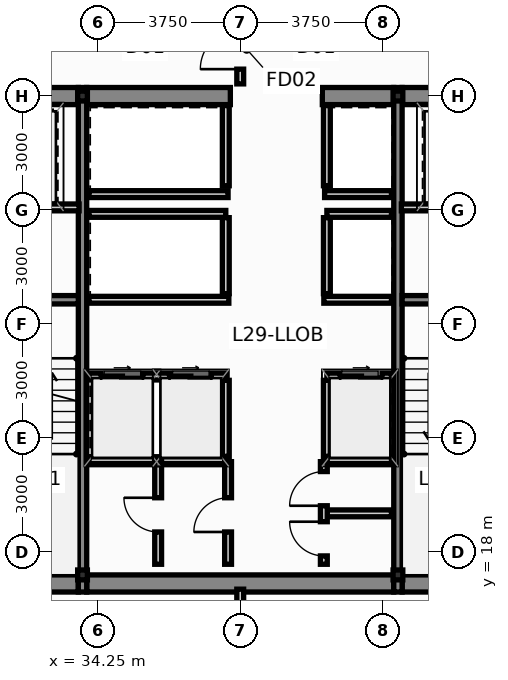
"""IFC4 building model, lengths in metres.
Left out: names, types, materials, properties, quantities, classifications, styles, units other than length and angle.
Written with IfcOpenShell. Run it as: python <this file> out.ifc"""

import sys

from ifc_helpers import new_model, si_unit, direction, frame, frame_2d, origin, origin_2d, place, context, subcontext, project, spatial, rectangle, i_section, extrude, source, transform, mapped, element, fill, save


model = new_model("IFC4")
c1 = context("Model", 3, precision=1e-05, world=origin(), true_north=direction((0.0, 1.0)))
c2 = subcontext(c1, "Body", "Model", "MODEL_VIEW")
j1 = project(units=[si_unit("LENGTHUNIT", "METRE"), si_unit("PLANEANGLEUNIT", "RADIAN")], contexts=[c1])
p1 = place(None, origin())
s1 = spatial("IfcSite", under=j1, at=p1, CompositionType="ELEMENT")
p2 = place(p1, origin())
s2 = spatial("IfcBuilding", under=s1, at=p2, CompositionType="ELEMENT")
p3 = place(p2, frame((0.0, 0.0, 112.7)))
s3 = spatial("IfcBuildingStorey", under=s2, at=p3, CompositionType="ELEMENT", Elevation=112.7)
m1 = source(origin(), c2, "Body", "SweptSolid", [
    extrude(i_section(OverallWidth=0.256, OverallDepth=0.26, WebThickness=0.01, FlangeThickness=0.017, at=origin_2d()), origin(), (0.0, 0.0, 1.0), 3.65),
])
for number, where, z_axis, x_axis in (
    (1, (33.85, 17.4, 0.0), (0.0, 0.0, 1.0), (1.0, 0.0, 0.0)),
    (2, (42.15, 17.4, 0.0), (0.0, 0.0, 1.0), (1.0, 0.0, 0.0)),
    (3, (33.85, 30.0, 0.0), (0.0, 0.0, 1.0), (1.0, 0.0, 0.0)),
    (4, (42.15, 30.0, 0.0), (0.0, 0.0, 1.0), (1.0, 0.0, 0.0)),
):
    element("IfcColumn", number, at=place(p3, frame(where, z_axis=z_axis, x_axis=x_axis)), inside=s3, PredefinedType="COLUMN", context=c2, shape_type="MappedRepresentation", body=[
        mapped(m1, transform((0.0, 0.0, 0.0), scale=1.0)),
    ])
p4 = place(p3, frame((30.84, 17.175, 0.0), z_axis=(0.0, 0.0, 1.0), x_axis=(1.0, 0.0, 0.0)))
e5 = element("IfcWall", 5, at=p4, inside=s3, PredefinedType="SHEAR", context=c2, shape_type="SweptSolid", body=[
    extrude(rectangle(XDim=2.9, YDim=0.45, at=frame_2d((1.45, 0.0))), origin(), (0.0, 0.0, 1.0), 3.65),
])
p5 = place(p3, frame((33.96, 17.175, 0.0), z_axis=(0.0, 0.0, 1.0), x_axis=(1.0, 0.0, 0.0)))
e6 = element("IfcWall", 6, at=p5, inside=s3, PredefinedType="SHEAR", context=c2, shape_type="SweptSolid", body=[
    extrude(rectangle(XDim=8.08, YDim=0.45, at=frame_2d((4.04, 0.0))), origin(), (0.0, 0.0, 1.0), 3.65),
])
for number, where, z_axis, x_axis in (
    (7, (42.26, 17.175, 0.0), (0.0, 0.0, 1.0), (1.0, 0.0, 0.0)),
    (8, (30.84, 30.0, 0.0), (0.0, 0.0, 1.0), (1.0, 0.0, 0.0)),
):
    element("IfcWall", number, at=place(p3, frame(where, z_axis=z_axis, x_axis=x_axis)), inside=s3, PredefinedType="SHEAR", context=c2, shape_type="SweptSolid", body=[
        extrude(rectangle(XDim=2.9, YDim=0.45, at=frame_2d((1.45, 0.0))), origin(), (0.0, 0.0, 1.0), 3.65),
    ])
p6 = place(p3, frame((33.96, 30.0, 0.0), z_axis=(0.0, 0.0, 1.0), x_axis=(1.0, 0.0, 0.0)))
e9 = element("IfcWall", 9, at=p6, inside=s3, PredefinedType="SHEAR", context=c2, shape_type="SweptSolid", body=[
    extrude(rectangle(XDim=3.78, YDim=0.45, at=frame_2d((1.89, 0.0))), origin(), (0.0, 0.0, 1.0), 3.65),
])
p7 = place(p3, frame((40.16, 30.0, 0.0), z_axis=(0.0, 0.0, 1.0), x_axis=(1.0, 0.0, 0.0)))
e10 = element("IfcWall", 10, at=p7, inside=s3, PredefinedType="SHEAR", context=c2, shape_type="SweptSolid", body=[
    extrude(rectangle(XDim=1.88, YDim=0.45, at=frame_2d((0.94, 0.0))), origin(), (0.0, 0.0, 1.0), 3.65),
])
p8 = place(p3, frame((42.26, 30.0, 0.0), z_axis=(0.0, 0.0, 1.0), x_axis=(1.0, 0.0, 0.0)))
e11 = element("IfcWall", 11, at=p8, inside=s3, PredefinedType="SHEAR", context=c2, shape_type="SweptSolid", body=[
    extrude(rectangle(XDim=2.9, YDim=0.45, at=frame_2d((1.45, 0.0))), origin(), (0.0, 0.0, 1.0), 3.65),
])
for number, where, z_axis, x_axis in (
    (12, (33.85, 16.95, 0.0), (0.0, 0.0, 1.0), (0.0, 1.0, 0.0)),
    (13, (42.15, 16.95, 0.0), (0.0, 0.0, 1.0), (0.0, 1.0, 0.0)),
):
    element("IfcWall", number, at=place(p3, frame(where, z_axis=z_axis, x_axis=x_axis)), inside=s3, PredefinedType="SHEAR", context=c2, shape_type="SweptSolid", body=[
        extrude(rectangle(XDim=13.275, YDim=0.22, at=frame_2d((6.638, 0.0))), origin(), (0.0, 0.0, 1.0), 3.65),
    ])
for number, where, z_axis, x_axis in (
    (14, (30.84, 24.64, 0.0), (0.0, 0.0, 1.0), (1.0, 0.0, 0.0)),
    (15, (42.26, 24.64, 0.0), (0.0, 0.0, 1.0), (1.0, 0.0, 0.0)),
):
    element("IfcWall", number, at=place(p3, frame(where, z_axis=z_axis, x_axis=x_axis)), inside=s3, PredefinedType="SHEAR", context=c2, shape_type="SweptSolid", body=[
        extrude(rectangle(XDim=2.9, YDim=0.22, at=frame_2d((1.45, 0.0))), origin(), (0.0, 0.0, 1.0), 3.65),
    ])
p9 = place(p3, frame((34.02, 22.62, 0.0), z_axis=(0.0, 0.0, 1.0), x_axis=(1.0, 0.0, 0.0)))
e16 = element("IfcWall", 16, at=p9, inside=s3, PredefinedType="PARTITIONING", context=c2, shape_type="SweptSolid", body=[
    extrude(rectangle(XDim=3.6, YDim=0.18, at=frame_2d((1.8, 0.0))), origin(), (0.0, 0.0, 1.0), 3.4),
])
p10 = place(p9, frame((0.32, 0.0, 0.0)))
e17 = element("IfcOpeningElement", 17, at=p10, cuts=e16, PredefinedType="OPENING", context=c2, shape_type="SweptSolid", body=[
    extrude(rectangle(XDim=1.1, YDim=2.2, at=frame_2d((0.55, 1.1))), frame((0.0, 0.102, 0.0), z_axis=(0.0, -1.0, 0.0), x_axis=(1.0, 0.0, 0.0)), (0.0, 0.0, 1.0), 0.204),
])
p11 = place(p9, frame((2.12, 0.0, 0.0)))
e18 = element("IfcOpeningElement", 18, at=p11, cuts=e16, PredefinedType="OPENING", context=c2, shape_type="SweptSolid", body=[
    extrude(rectangle(XDim=1.1, YDim=2.2, at=frame_2d((0.55, 1.1))), frame((0.0, 0.102, 0.0), z_axis=(0.0, -1.0, 0.0), x_axis=(1.0, 0.0, 0.0)), (0.0, 0.0, 1.0), 0.204),
])
p12 = place(p3, frame((40.28, 22.62, 0.0), z_axis=(0.0, 0.0, 1.0), x_axis=(1.0, 0.0, 0.0)))
e19 = element("IfcWall", 19, at=p12, inside=s3, PredefinedType="PARTITIONING", context=c2, shape_type="SweptSolid", body=[
    extrude(rectangle(XDim=1.7, YDim=0.18, at=frame_2d((0.85, 0.0))), origin(), (0.0, 0.0, 1.0), 3.4),
])
p13 = place(p12, frame((0.35, 0.0, 0.0)))
e20 = element("IfcOpeningElement", 20, at=p13, cuts=e19, PredefinedType="OPENING", context=c2, shape_type="SweptSolid", body=[
    extrude(rectangle(XDim=1.1, YDim=2.2, at=frame_2d((0.55, 1.1))), frame((0.0, 0.102, 0.0), z_axis=(0.0, -1.0, 0.0), x_axis=(1.0, 0.0, 0.0)), (0.0, 0.0, 1.0), 0.204),
])
for number, where, z_axis, x_axis in (
    (21, (37.62, 20.52, 0.0), (0.0, 0.0, 1.0), (0.0, 1.0, 0.0)),
    (22, (40.28, 20.52, 0.0), (0.0, 0.0, 1.0), (0.0, 1.0, 0.0)),
):
    element("IfcWall", number, at=place(p3, frame(where, z_axis=z_axis, x_axis=x_axis)), inside=s3, PredefinedType="PARTITIONING", context=c2, shape_type="SweptSolid", body=[
        extrude(rectangle(XDim=2.0, YDim=0.18, at=frame_2d((1.0, 0.0))), origin(), (0.0, 0.0, 1.0), 3.4),
    ])
p14 = place(p3, frame((34.02, 26.9, 0.0), z_axis=(0.0, 0.0, 1.0), x_axis=(1.0, 0.0, 0.0)))
e23 = element("IfcWall", 23, at=p14, inside=s3, PredefinedType="PARTITIONING", context=c2, shape_type="SweptSolid", body=[
    extrude(rectangle(XDim=3.6, YDim=0.18, at=frame_2d((1.8, 0.0))), origin(), (0.0, 0.0, 1.0), 3.4),
])
p15 = place(p3, frame((40.28, 26.9, 0.0), z_axis=(0.0, 0.0, 1.0), x_axis=(1.0, 0.0, 0.0)))
e24 = element("IfcWall", 24, at=p15, inside=s3, PredefinedType="PARTITIONING", context=c2, shape_type="SweptSolid", body=[
    extrude(rectangle(XDim=1.7, YDim=0.18, at=frame_2d((0.85, 0.0))), origin(), (0.0, 0.0, 1.0), 3.4),
])
for number, where, z_axis, x_axis in (
    (25, (37.62, 24.8, 0.0), (0.0, 0.0, 1.0), (0.0, 1.0, 0.0)),
    (26, (40.28, 24.8, 0.0), (0.0, 0.0, 1.0), (0.0, 1.0, 0.0)),
):
    element("IfcWall", number, at=place(p3, frame(where, z_axis=z_axis, x_axis=x_axis)), inside=s3, PredefinedType="PARTITIONING", context=c2, shape_type="SweptSolid", body=[
        extrude(rectangle(XDim=2.0, YDim=0.18, at=frame_2d((1.0, 0.0))), origin(), (0.0, 0.0, 1.0), 3.4),
    ])
p16 = place(p3, frame((34.02, 24.64, 0.0), z_axis=(0.0, 0.0, 1.0), x_axis=(1.0, 0.0, 0.0)))
e27 = element("IfcWall", 27, at=p16, inside=s3, PredefinedType="PARTITIONING", context=c2, shape_type="SweptSolid", body=[
    extrude(rectangle(XDim=3.68, YDim=0.18, at=frame_2d((1.84, 0.0))), origin(), (0.0, 0.0, 1.0), 3.4),
])
p17 = place(p3, frame((40.2, 24.64, 0.0), z_axis=(0.0, 0.0, 1.0), x_axis=(1.0, 0.0, 0.0)))
e28 = element("IfcWall", 28, at=p17, inside=s3, PredefinedType="PARTITIONING", context=c2, shape_type="SweptSolid", body=[
    extrude(rectangle(XDim=1.78, YDim=0.18, at=frame_2d((0.89, 0.0))), origin(), (0.0, 0.0, 1.0), 3.4),
])
p18 = place(p3, frame((34.02, 27.42, 0.0), z_axis=(0.0, 0.0, 1.0), x_axis=(1.0, 0.0, 0.0)))
e29 = element("IfcWall", 29, at=p18, inside=s3, PredefinedType="PARTITIONING", context=c2, shape_type="SweptSolid", body=[
    extrude(rectangle(XDim=3.66, YDim=0.18, at=frame_2d((1.83, 0.0))), origin(), (0.0, 0.0, 1.0), 3.4),
])
p19 = place(p3, frame((40.22, 27.42, 0.0), z_axis=(0.0, 0.0, 1.0), x_axis=(1.0, 0.0, 0.0)))
e30 = element("IfcWall", 30, at=p19, inside=s3, PredefinedType="PARTITIONING", context=c2, shape_type="SweptSolid", body=[
    extrude(rectangle(XDim=1.76, YDim=0.18, at=frame_2d((0.88, 0.0))), origin(), (0.0, 0.0, 1.0), 3.4),
])
for number, where, z_axis, x_axis in (
    (31, (37.62, 27.64, 0.0), (0.0, 0.0, 1.0), (0.0, 1.0, 0.0)),
    (32, (40.28, 27.64, 0.0), (0.0, 0.0, 1.0), (0.0, 1.0, 0.0)),
):
    element("IfcWall", number, at=place(p3, frame(where, z_axis=z_axis, x_axis=x_axis)), inside=s3, PredefinedType="PARTITIONING", context=c2, shape_type="SweptSolid", body=[
        extrude(rectangle(XDim=2.11, YDim=0.18, at=frame_2d((1.055, 0.0))), origin(), (0.0, 0.0, 1.0), 3.4),
    ])
for number, where, z_axis, x_axis in (
    (33, (30.86, 27.07, 0.0), (0.0, 0.0, 1.0), (1.0, 0.0, 0.0)),
    (34, (42.24, 27.07, 0.0), (0.0, 0.0, 1.0), (1.0, 0.0, 0.0)),
):
    element("IfcWall", number, at=place(p3, frame(where, z_axis=z_axis, x_axis=x_axis)), inside=s3, PredefinedType="PARTITIONING", context=c2, shape_type="SweptSolid", body=[
        extrude(rectangle(XDim=2.9, YDim=0.18, at=frame_2d((1.45, 0.0))), origin(), (0.0, 0.0, 1.0), 3.4),
    ])
p20 = place(p3, frame((34.02, 20.42, 0.0), z_axis=(0.0, 0.0, 1.0), x_axis=(1.0, 0.0, 0.0)))
e35 = element("IfcWall", 35, at=p20, inside=s3, PredefinedType="PARTITIONING", context=c2, shape_type="SweptSolid", body=[
    extrude(rectangle(XDim=3.64, YDim=0.18, at=frame_2d((1.82, 0.0))), origin(), (0.0, 0.0, 1.0), 3.4),
])
p21 = place(p3, frame((40.22, 20.42, 0.0), z_axis=(0.0, 0.0, 1.0), x_axis=(1.0, 0.0, 0.0)))
e36 = element("IfcWall", 36, at=p21, inside=s3, PredefinedType="PARTITIONING", context=c2, shape_type="SweptSolid", body=[
    extrude(rectangle(XDim=1.76, YDim=0.18, at=frame_2d((0.88, 0.0))), origin(), (0.0, 0.0, 1.0), 3.4),
])
p22 = place(p3, frame((35.84, 17.68, 0.0), z_axis=(0.0, 0.0, 1.0), x_axis=(0.0, 1.0, 0.0)))
e37 = element("IfcWall", 37, at=p22, inside=s3, PredefinedType="PARTITIONING", context=c2, shape_type="SweptSolid", body=[
    extrude(rectangle(XDim=2.7, YDim=0.18, at=frame_2d((1.35, 0.0))), origin(), (0.0, 0.0, 1.0), 3.4),
])
p23 = place(p22, frame((0.85, 0.0, 0.0)))
e38 = element("IfcOpeningElement", 38, at=p23, cuts=e37, PredefinedType="OPENING", context=c2, shape_type="SweptSolid", body=[
    extrude(rectangle(XDim=0.9, YDim=2.1, at=frame_2d((0.45, 1.05))), frame((0.0, 0.102, 0.0), z_axis=(0.0, -1.0, 0.0), x_axis=(1.0, 0.0, 0.0)), (0.0, 0.0, 1.0), 0.204),
])
p24 = place(p3, frame((37.68, 17.68, 0.0), z_axis=(0.0, 0.0, 1.0), x_axis=(0.0, 1.0, 0.0)))
e39 = element("IfcWall", 39, at=p24, inside=s3, PredefinedType="PARTITIONING", context=c2, shape_type="SweptSolid", body=[
    extrude(rectangle(XDim=2.7, YDim=0.18, at=frame_2d((1.35, 0.0))), origin(), (0.0, 0.0, 1.0), 3.4),
])
p25 = place(p24, frame((0.85, 0.0, 0.0)))
e40 = element("IfcOpeningElement", 40, at=p25, cuts=e39, PredefinedType="OPENING", context=c2, shape_type="SweptSolid", body=[
    extrude(rectangle(XDim=0.9, YDim=2.1, at=frame_2d((0.45, 1.05))), frame((0.0, 0.102, 0.0), z_axis=(0.0, -1.0, 0.0), x_axis=(1.0, 0.0, 0.0)), (0.0, 0.0, 1.0), 0.204),
])
p26 = place(p3, frame((40.28, 19.02, 0.0), z_axis=(0.0, 0.0, 1.0), x_axis=(1.0, 0.0, 0.0)))
e41 = element("IfcWall", 41, at=p26, inside=s3, PredefinedType="PARTITIONING", context=c2, shape_type="SweptSolid", body=[
    extrude(rectangle(XDim=1.7, YDim=0.18, at=frame_2d((0.85, 0.0))), origin(), (0.0, 0.0, 1.0), 3.4),
])
p27 = place(p3, frame((40.2, 17.68, 0.0), z_axis=(0.0, 0.0, 1.0), x_axis=(0.0, 1.0, 0.0)))
e42 = element("IfcWall", 42, at=p27, inside=s3, PredefinedType="PARTITIONING", context=c2, shape_type="SweptSolid", body=[
    extrude(rectangle(XDim=2.7, YDim=0.18, at=frame_2d((1.35, 0.0))), origin(), (0.0, 0.0, 1.0), 3.4),
])
p28 = place(p27, frame((0.22, 0.0, 0.0)))
e43 = element("IfcOpeningElement", 43, at=p28, cuts=e42, PredefinedType="OPENING", context=c2, shape_type="SweptSolid", body=[
    extrude(rectangle(XDim=0.9, YDim=2.1, at=frame_2d((0.45, 1.05))), frame((0.0, 0.102, 0.0), z_axis=(0.0, -1.0, 0.0), x_axis=(1.0, 0.0, 0.0)), (0.0, 0.0, 1.0), 0.204),
])
p29 = place(p27, frame((1.54, 0.0, 0.0)))
e44 = element("IfcOpeningElement", 44, at=p29, cuts=e42, PredefinedType="OPENING", context=c2, shape_type="SweptSolid", body=[
    extrude(rectangle(XDim=0.9, YDim=2.1, at=frame_2d((0.45, 1.05))), frame((0.0, 0.102, 0.0), z_axis=(0.0, -1.0, 0.0), x_axis=(1.0, 0.0, 0.0)), (0.0, 0.0, 1.0), 0.204),
])
p30 = place(p3, frame((38.0, 15.205, 0.0), z_axis=(0.0, 0.0, 1.0), x_axis=(0.0, 1.0, 0.0)))
e45 = element("IfcWall", 45, at=p30, inside=s3, PredefinedType="PARTITIONING", context=c2, shape_type="SweptSolid", body=[
    extrude(rectangle(XDim=1.82, YDim=0.18, at=frame_2d((0.91, 0.0))), origin(), (0.0, 0.0, 1.0), 3.4),
])
p31 = place(p30, frame((0.385, 0.0, 0.0)))
e46 = element("IfcOpeningElement", 46, at=p31, cuts=e45, PredefinedType="OPENING", context=c2, shape_type="SweptSolid", body=[
    extrude(rectangle(XDim=1.05, YDim=2.15, at=frame_2d((0.525, 1.075))), frame((0.0, 0.102, 0.0), z_axis=(0.0, -1.0, 0.0), x_axis=(1.0, 0.0, 0.0)), (0.0, 0.0, 1.0), 0.204),
])
p32 = place(p3, frame((38.0, 30.32, 0.0), z_axis=(0.0, 0.0, 1.0), x_axis=(0.0, 1.0, 0.0)))
e47 = element("IfcWall", 47, at=p32, inside=s3, PredefinedType="PARTITIONING", context=c2, shape_type="SweptSolid", body=[
    extrude(rectangle(XDim=1.825, YDim=0.18, at=frame_2d((0.913, 0.0))), origin(), (0.0, 0.0, 1.0), 3.4),
])
p33 = place(p32, frame((0.388, 0.0, 0.0)))
e48 = element("IfcOpeningElement", 48, at=p33, cuts=e47, PredefinedType="OPENING", context=c2, shape_type="SweptSolid", body=[
    extrude(rectangle(XDim=1.05, YDim=2.15, at=frame_2d((0.525, 1.075))), frame((0.0, 0.102, 0.0), z_axis=(0.0, -1.0, 0.0), x_axis=(1.0, 0.0, 0.0)), (0.0, 0.0, 1.0), 0.204),
])
p34 = place(p10, origin())
e49 = element("IfcDoor", 49, at=p34, inside=s3, OperationType="SLIDING_TO_LEFT", PredefinedType="DOOR", context=c2, shape_type="SweptSolid", body=[
    extrude(rectangle(XDim=1.1, YDim=2.2, at=frame_2d((0.55, 1.1))), frame((0.0, 0.025, 0.0), z_axis=(0.0, -1.0, 0.0), x_axis=(1.0, 0.0, 0.0)), (0.0, 0.0, 1.0), 0.05),
])
fill(e17, e49)
p35 = place(p11, origin())
e50 = element("IfcDoor", 50, at=p35, inside=s3, OperationType="SLIDING_TO_RIGHT", PredefinedType="DOOR", context=c2, shape_type="SweptSolid", body=[
    extrude(rectangle(XDim=1.1, YDim=2.2, at=frame_2d((0.55, 1.1))), frame((0.0, 0.025, 0.0), z_axis=(0.0, -1.0, 0.0), x_axis=(1.0, 0.0, 0.0)), (0.0, 0.0, 1.0), 0.05),
])
fill(e18, e50)
p36 = place(p13, origin())
e51 = element("IfcDoor", 51, at=p36, inside=s3, OperationType="SLIDING_TO_LEFT", PredefinedType="DOOR", context=c2, shape_type="SweptSolid", body=[
    extrude(rectangle(XDim=1.1, YDim=2.2, at=frame_2d((0.55, 1.1))), frame((0.0, 0.025, 0.0), z_axis=(0.0, -1.0, 0.0), x_axis=(1.0, 0.0, 0.0)), (0.0, 0.0, 1.0), 0.05),
])
fill(e20, e51)
p37 = place(p23, origin())
e52 = element("IfcDoor", 52, at=p37, inside=s3, OperationType="SINGLE_SWING_RIGHT", PredefinedType="DOOR", context=c2, shape_type="SweptSolid", body=[
    extrude(rectangle(XDim=0.9, YDim=2.1, at=frame_2d((0.45, 1.05))), frame((0.0, 0.025, 0.0), z_axis=(0.0, -1.0, 0.0), x_axis=(1.0, 0.0, 0.0)), (0.0, 0.0, 1.0), 0.05),
])
fill(e38, e52)
p38 = place(p25, origin())
e53 = element("IfcDoor", 53, at=p38, inside=s3, OperationType="SINGLE_SWING_LEFT", PredefinedType="DOOR", context=c2, shape_type="SweptSolid", body=[
    extrude(rectangle(XDim=0.9, YDim=2.1, at=frame_2d((0.45, 1.05))), frame((0.0, 0.025, 0.0), z_axis=(0.0, -1.0, 0.0), x_axis=(1.0, 0.0, 0.0)), (0.0, 0.0, 1.0), 0.05),
])
fill(e40, e53)
p39 = place(p28, origin())
e54 = element("IfcDoor", 54, at=p39, inside=s3, OperationType="SINGLE_SWING_RIGHT", PredefinedType="DOOR", context=c2, shape_type="SweptSolid", body=[
    extrude(rectangle(XDim=0.9, YDim=2.1, at=frame_2d((0.45, 1.05))), frame((0.0, 0.025, 0.0), z_axis=(0.0, -1.0, 0.0), x_axis=(1.0, 0.0, 0.0)), (0.0, 0.0, 1.0), 0.05),
])
fill(e43, e54)
p40 = place(p29, origin())
e55 = element("IfcDoor", 55, at=p40, inside=s3, OperationType="SINGLE_SWING_LEFT", PredefinedType="DOOR", context=c2, shape_type="SweptSolid", body=[
    extrude(rectangle(XDim=0.9, YDim=2.1, at=frame_2d((0.45, 1.05))), frame((0.0, 0.025, 0.0), z_axis=(0.0, -1.0, 0.0), x_axis=(1.0, 0.0, 0.0)), (0.0, 0.0, 1.0), 0.05),
])
fill(e44, e55)
p41 = place(p33, origin())
e56 = element("IfcDoor", 56, at=p41, inside=s3, OperationType="SINGLE_SWING_LEFT", PredefinedType="DOOR", context=c2, shape_type="SweptSolid", body=[
    extrude(rectangle(XDim=1.05, YDim=2.15, at=frame_2d((0.525, 1.075))), frame((0.0, 0.025, 0.0), z_axis=(0.0, -1.0, 0.0), x_axis=(1.0, 0.0, 0.0)), (0.0, 0.0, 1.0), 0.05),
])
fill(e48, e56)
save(model, sys.argv[1])
